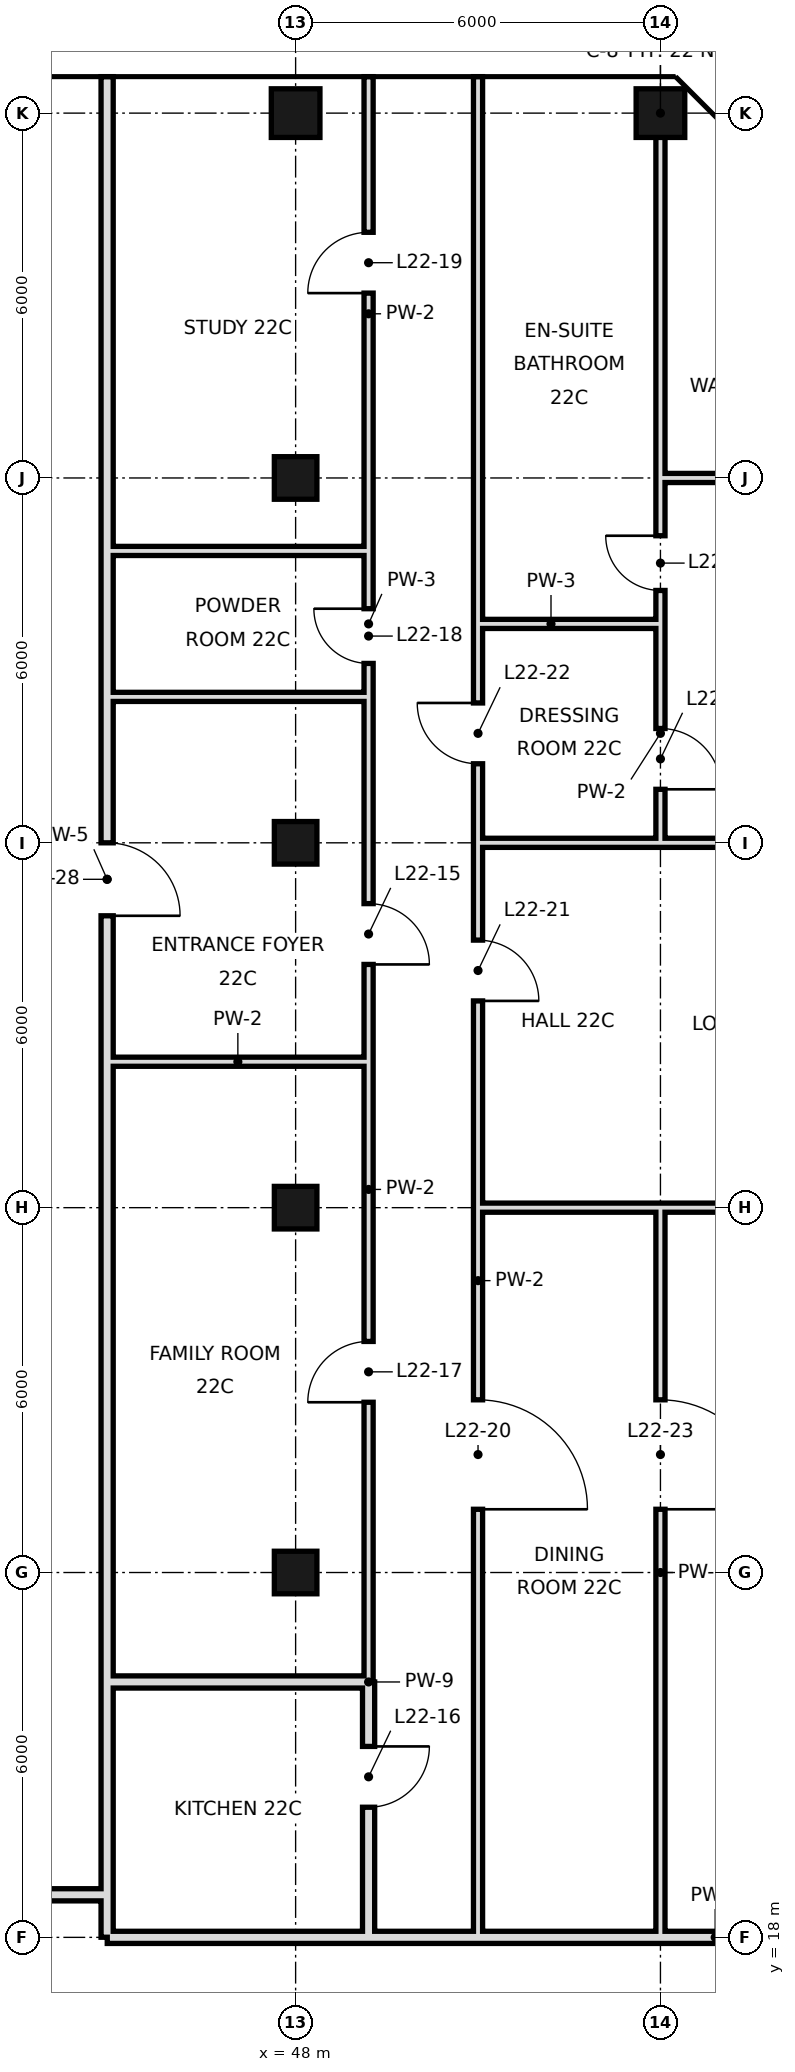
"""IFC4 building model, lengths in metres.
Left out: names, types, materials, properties, quantities, classifications, styles, units other than length and angle.
Written with IfcOpenShell. Run it as: python <this file> out.ifc"""

import sys

from ifc_helpers import new_model, si_unit, direction, frame, frame_2d, origin, origin_2d, place, context, subcontext, project, spatial, rectangle, hollow_rectangle, extrude, element, fill, save


model = new_model("IFC4")
c1 = context("Model", 3, precision=1e-05, world=origin(), true_north=direction((0.0, 1.0)))
c2 = subcontext(c1, "Body", "Model", "MODEL_VIEW")
j1 = project(units=[si_unit("LENGTHUNIT", "METRE"), si_unit("PLANEANGLEUNIT", "RADIAN")], contexts=[c1])
p1 = place(None, origin())
s1 = spatial("IfcSite", under=j1, at=p1, CompositionType="ELEMENT")
p2 = place(p1, origin())
s2 = spatial("IfcBuilding", under=s1, at=p2, CompositionType="ELEMENT")
p3 = place(p2, frame((0.0, 0.0, 103.4)))
s3 = spatial("IfcBuildingStorey", under=s2, at=p3, CompositionType="ELEMENT", Elevation=103.4)
for number, where, z_axis, x_axis in (
    (1, (48.0, 24.0, 0.0), (0.0, 0.0, 1.0), (1.0, 0.0, 0.0)),
    (2, (48.0, 30.0, 0.0), (0.0, 0.0, 1.0), (1.0, 0.0, 0.0)),
    (3, (48.0, 36.0, 0.0), (0.0, 0.0, 1.0), (1.0, 0.0, 0.0)),
    (4, (48.0, 42.0, 0.0), (0.0, 0.0, 1.0), (1.0, 0.0, 0.0)),
):
    element("IfcColumn", number, at=place(p3, frame(where, z_axis=z_axis, x_axis=x_axis)), inside=s3, PredefinedType="COLUMN", context=c2, shape_type="SweptSolid", body=[
        extrude(hollow_rectangle(XDim=0.7, YDim=0.7, WallThickness=0.036, at=origin_2d()), origin(), (0.0, 0.0, 1.0), 3.6),
    ])
for number, where, z_axis, x_axis in (
    (5, (48.0, 48.0, 0.0), (0.0, 0.0, 1.0), (1.0, 0.0, 0.0)),
    (6, (54.0, 48.0, 0.0), (0.0, 0.0, 1.0), (1.0, 0.0, 0.0)),
):
    element("IfcColumn", number, at=place(p3, frame(where, z_axis=z_axis, x_axis=x_axis)), inside=s3, PredefinedType="COLUMN", context=c2, shape_type="SweptSolid", body=[
        extrude(hollow_rectangle(XDim=0.8, YDim=0.8, WallThickness=0.04, at=origin_2d()), origin(), (0.0, 0.0, 1.0), 3.6),
    ])
p4 = place(p3, frame((44.9, 22.2, 0.0), z_axis=(0.0, 0.0, 1.0), x_axis=(0.0, 1.0, 0.0)))
e7 = element("IfcWall", 7, at=p4, inside=s3, PredefinedType="SOLIDWALL", context=c2, shape_type="SweptSolid", body=[
    extrude(rectangle(XDim=26.4, YDim=0.2, at=frame_2d((13.2, 0.0))), origin(), (0.0, 0.0, 1.0), 2.72),
])
p5 = place(p4, frame((12.6, 0.0, 0.0)))
e8 = element("IfcOpeningElement", 8, at=p5, cuts=e7, PredefinedType="OPENING", context=c2, shape_type="SweptSolid", body=[
    extrude(rectangle(XDim=1.2, YDim=2.4, at=frame_2d((0.6, 1.2))), frame((0.0, 0.11, 0.0), z_axis=(0.0, -1.0, 0.0), x_axis=(1.0, 0.0, 0.0)), (0.0, 0.0, 1.0), 0.22),
])
p6 = place(p3, frame((44.9, 18.002, 0.0), z_axis=(0.0, 0.0, 1.0), x_axis=(0.0, 1.0, 0.0)))
e9 = element("IfcWall", 9, at=p6, inside=s3, PredefinedType="SOLIDWALL", context=c2, shape_type="SweptSolid", body=[
    extrude(rectangle(XDim=4.198, YDim=0.2, at=frame_2d((2.099, 0.0))), origin(), (0.0, 0.0, 1.0), 3.42),
])
p7 = place(p3, frame((49.2, 18.0, 0.0), z_axis=(0.0, 0.0, 1.0), x_axis=(0.0, 1.0, 0.0)))
e10 = element("IfcWall", 10, at=p7, inside=s3, PredefinedType="SOLIDWALL", context=c2, shape_type="SweptSolid", body=[
    extrude(rectangle(XDim=4.2, YDim=0.2, at=frame_2d((2.1, 0.0))), origin(), (0.0, 0.0, 1.0), 2.72),
])
p8 = place(p7, frame((2.14, 0.0, 0.0)))
e11 = element("IfcOpeningElement", 11, at=p8, cuts=e10, PredefinedType="OPENING", context=c2, shape_type="SweptSolid", body=[
    extrude(rectangle(XDim=1.0, YDim=2.4, at=frame_2d((0.5, 1.2))), frame((0.0, 0.11, 0.0), z_axis=(0.0, -1.0, 0.0), x_axis=(1.0, 0.0, 0.0)), (0.0, 0.0, 1.0), 0.22),
])
p9 = place(p3, frame((49.2, 22.2, 0.0), z_axis=(0.0, 0.0, 1.0), x_axis=(0.0, 1.0, 0.0)))
e12 = element("IfcWall", 12, at=p9, inside=s3, PredefinedType="PARTITIONING", context=c2, shape_type="SweptSolid", body=[
    extrude(rectangle(XDim=16.2, YDim=0.15, at=frame_2d((8.1, 0.0))), origin(), (0.0, 0.0, 1.0), 3.42),
])
p10 = place(p9, frame((11.8, 0.0, 0.0)))
e13 = element("IfcOpeningElement", 13, at=p10, cuts=e12, PredefinedType="OPENING", context=c2, shape_type="SweptSolid", body=[
    extrude(rectangle(XDim=1.0, YDim=2.4, at=frame_2d((0.5, 1.2))), frame((0.0, 0.085, 0.0), z_axis=(0.0, -1.0, 0.0), x_axis=(1.0, 0.0, 0.0)), (0.0, 0.0, 1.0), 0.17),
])
p11 = place(p9, frame((4.6, 0.0, 0.0)))
e14 = element("IfcOpeningElement", 14, at=p11, cuts=e12, PredefinedType="OPENING", context=c2, shape_type="SweptSolid", body=[
    extrude(rectangle(XDim=1.0, YDim=2.4, at=frame_2d((0.5, 1.2))), frame((0.0, 0.085, 0.0), z_axis=(0.0, -1.0, 0.0), x_axis=(1.0, 0.0, 0.0)), (0.0, 0.0, 1.0), 0.17),
])
p12 = place(p3, frame((49.2, 40.8, 0.0), z_axis=(0.0, 0.0, 1.0), x_axis=(0.0, 1.0, 0.0)))
e15 = element("IfcWall", 15, at=p12, inside=s3, PredefinedType="PARTITIONING", context=c2, shape_type="SweptSolid", body=[
    extrude(rectangle(XDim=7.8, YDim=0.15, at=frame_2d((3.9, 0.0))), origin(), (0.0, 0.0, 1.0), 3.42),
])
p13 = place(p12, frame((4.24, 0.0, 0.0)))
e16 = element("IfcOpeningElement", 16, at=p13, cuts=e15, PredefinedType="OPENING", context=c2, shape_type="SweptSolid", body=[
    extrude(rectangle(XDim=1.0, YDim=2.4, at=frame_2d((0.5, 1.2))), frame((0.0, 0.085, 0.0), z_axis=(0.0, -1.0, 0.0), x_axis=(1.0, 0.0, 0.0)), (0.0, 0.0, 1.0), 0.17),
])
p14 = place(p3, frame((49.2, 38.4, 0.0), z_axis=(0.0, 0.0, 1.0), x_axis=(0.0, 1.0, 0.0)))
e17 = element("IfcWall", 17, at=p14, inside=s3, PredefinedType="PARTITIONING", context=c2, shape_type="SweptSolid", body=[
    extrude(rectangle(XDim=2.4, YDim=0.15, at=frame_2d((1.2, 0.0))), origin(), (0.0, 0.0, 1.0), 3.42),
])
p15 = place(p14, frame((0.55, 0.0, 0.0)))
e18 = element("IfcOpeningElement", 18, at=p15, cuts=e17, PredefinedType="OPENING", context=c2, shape_type="SweptSolid", body=[
    extrude(rectangle(XDim=0.9, YDim=2.4, at=frame_2d((0.45, 1.2))), frame((0.0, 0.085, 0.0), z_axis=(0.0, -1.0, 0.0), x_axis=(1.0, 0.0, 0.0)), (0.0, 0.0, 1.0), 0.17),
])
p16 = place(p3, frame((51.0, 18.0, 0.0), z_axis=(0.0, 0.0, 1.0), x_axis=(0.0, 1.0, 0.0)))
e19 = element("IfcWall", 19, at=p16, inside=s3, PredefinedType="PARTITIONING", context=c2, shape_type="SweptSolid", body=[
    extrude(rectangle(XDim=21.6, YDim=0.15, at=frame_2d((10.8, 0.0))), origin(), (0.0, 0.0, 1.0), 3.42),
])
p17 = place(p16, frame((7.04, 0.0, 0.0)))
e20 = element("IfcOpeningElement", 20, at=p17, cuts=e19, PredefinedType="OPENING", context=c2, shape_type="SweptSolid", body=[
    extrude(rectangle(XDim=1.8, YDim=2.4, at=frame_2d((0.9, 1.2))), frame((0.0, 0.085, 0.0), z_axis=(0.0, -1.0, 0.0), x_axis=(1.0, 0.0, 0.0)), (0.0, 0.0, 1.0), 0.17),
])
p18 = place(p16, frame((15.4, 0.0, 0.0)))
e21 = element("IfcOpeningElement", 21, at=p18, cuts=e19, PredefinedType="OPENING", context=c2, shape_type="SweptSolid", body=[
    extrude(rectangle(XDim=1.0, YDim=2.4, at=frame_2d((0.5, 1.2))), frame((0.0, 0.085, 0.0), z_axis=(0.0, -1.0, 0.0), x_axis=(1.0, 0.0, 0.0)), (0.0, 0.0, 1.0), 0.17),
])
p19 = place(p16, frame((19.3, 0.0, 0.0)))
e22 = element("IfcOpeningElement", 22, at=p19, cuts=e19, PredefinedType="OPENING", context=c2, shape_type="SweptSolid", body=[
    extrude(rectangle(XDim=1.0, YDim=2.4, at=frame_2d((0.5, 1.2))), frame((0.0, 0.085, 0.0), z_axis=(0.0, -1.0, 0.0), x_axis=(1.0, 0.0, 0.0)), (0.0, 0.0, 1.0), 0.17),
])
p20 = place(p3, frame((51.0, 39.6, 0.0), z_axis=(0.0, 0.0, 1.0), x_axis=(0.0, 1.0, 0.0)))
e23 = element("IfcWall", 23, at=p20, inside=s3, PredefinedType="PARTITIONING", context=c2, shape_type="SweptSolid", body=[
    extrude(rectangle(XDim=9.0, YDim=0.15, at=frame_2d((4.5, 0.0))), origin(), (0.0, 0.0, 1.0), 3.42),
])
p21 = place(p3, frame((54.0, 18.0, 0.0), z_axis=(0.0, 0.0, 1.0), x_axis=(0.0, 1.0, 0.0)))
e24 = element("IfcWall", 24, at=p21, inside=s3, PredefinedType="PARTITIONING", context=c2, shape_type="SweptSolid", body=[
    extrude(rectangle(XDim=12.0, YDim=0.15, at=frame_2d((6.0, 0.0))), origin(), (0.0, 0.0, 1.0), 3.42),
])
p22 = place(p21, frame((7.04, 0.0, 0.0)))
e25 = element("IfcOpeningElement", 25, at=p22, cuts=e24, PredefinedType="OPENING", context=c2, shape_type="SweptSolid", body=[
    extrude(rectangle(XDim=1.8, YDim=2.4, at=frame_2d((0.9, 1.2))), frame((0.0, 0.085, 0.0), z_axis=(0.0, -1.0, 0.0), x_axis=(1.0, 0.0, 0.0)), (0.0, 0.0, 1.0), 0.17),
])
p23 = place(p3, frame((54.0, 36.0, 0.0), z_axis=(0.0, 0.0, 1.0), x_axis=(0.0, 1.0, 0.0)))
e26 = element("IfcWall", 26, at=p23, inside=s3, PredefinedType="PARTITIONING", context=c2, shape_type="SweptSolid", body=[
    extrude(rectangle(XDim=3.6, YDim=0.15, at=frame_2d((1.8, 0.0))), origin(), (0.0, 0.0, 1.0), 3.42),
])
p24 = place(p23, frame((0.88, 0.0, 0.0)))
e27 = element("IfcOpeningElement", 27, at=p24, cuts=e26, PredefinedType="OPENING", context=c2, shape_type="SweptSolid", body=[
    extrude(rectangle(XDim=1.0, YDim=2.4, at=frame_2d((0.5, 1.2))), frame((0.0, 0.085, 0.0), z_axis=(0.0, -1.0, 0.0), x_axis=(1.0, 0.0, 0.0)), (0.0, 0.0, 1.0), 0.17),
])
p25 = place(p3, frame((54.0, 39.6, 0.0), z_axis=(0.0, 0.0, 1.0), x_axis=(0.0, 1.0, 0.0)))
e28 = element("IfcWall", 28, at=p25, inside=s3, PredefinedType="PARTITIONING", context=c2, shape_type="SweptSolid", body=[
    extrude(rectangle(XDim=8.4, YDim=0.15, at=frame_2d((4.2, 0.0))), origin(), (0.0, 0.0, 1.0), 3.42),
])
p26 = place(p25, frame((0.55, 0.0, 0.0)))
e29 = element("IfcOpeningElement", 29, at=p26, cuts=e28, PredefinedType="OPENING", context=c2, shape_type="SweptSolid", body=[
    extrude(rectangle(XDim=0.9, YDim=2.4, at=frame_2d((0.45, 1.2))), frame((0.0, 0.085, 0.0), z_axis=(0.0, -1.0, 0.0), x_axis=(1.0, 0.0, 0.0)), (0.0, 0.0, 1.0), 0.17),
])
p27 = place(p3, frame((49.2, 18.0, 0.0), z_axis=(0.0, 0.0, 1.0), x_axis=(1.0, 0.0, 0.0)))
e30 = element("IfcWall", 30, at=p27, inside=s3, PredefinedType="SOLIDWALL", context=c2, shape_type="SweptSolid", body=[
    extrude(rectangle(XDim=11.4, YDim=0.2, at=frame_2d((5.7, 0.0))), origin(), (0.0, 0.0, 1.0), 2.72),
])
p28 = place(p3, frame((44.902, 18.0, 0.0), z_axis=(0.0, 0.0, 1.0), x_axis=(1.0, 0.0, 0.0)))
e31 = element("IfcWall", 31, at=p28, inside=s3, PredefinedType="SOLIDWALL", context=c2, shape_type="SweptSolid", body=[
    extrude(rectangle(XDim=4.298, YDim=0.2, at=frame_2d((2.149, 0.0))), origin(), (0.0, 0.0, 1.0), 2.72),
])
p29 = place(p3, frame((3.1, 18.7, 0.0), z_axis=(0.0, 0.0, 1.0), x_axis=(1.0, 0.0, 0.0)))
e32 = element("IfcWall", 32, at=p29, inside=s3, PredefinedType="SOLIDWALL", context=c2, shape_type="SweptSolid", body=[
    extrude(rectangle(XDim=41.8, YDim=0.2, at=frame_2d((20.9, 0.0))), origin(), (0.0, 0.0, 1.0), 2.72),
])
p30 = place(p29, frame((18.12, 0.0, 0.0)))
e33 = element("IfcOpeningElement", 33, at=p30, cuts=e32, PredefinedType="OPENING", context=c2, shape_type="SweptSolid", body=[
    extrude(rectangle(XDim=1.2, YDim=2.4, at=frame_2d((0.6, 1.2))), frame((0.0, 0.11, 0.0), z_axis=(0.0, -1.0, 0.0), x_axis=(1.0, 0.0, 0.0)), (0.0, 0.0, 1.0), 0.22),
])
p31 = place(p29, frame((26.73, 0.0, 0.0)))
e34 = element("IfcOpeningElement", 34, at=p31, cuts=e32, PredefinedType="OPENING", context=c2, shape_type="SweptSolid", body=[
    extrude(rectangle(XDim=1.8, YDim=2.4, at=frame_2d((0.9, 1.2))), frame((0.0, 0.11, 0.0), z_axis=(0.0, -1.0, 0.0), x_axis=(1.0, 0.0, 0.0)), (0.0, 0.0, 1.0), 0.22),
])
p32 = place(p3, frame((44.9, 22.2, 0.0), z_axis=(0.0, 0.0, 1.0), x_axis=(1.0, 0.0, 0.0)))
e35 = element("IfcWall", 35, at=p32, inside=s3, PredefinedType="SOLIDWALL", context=c2, shape_type="SweptSolid", body=[
    extrude(rectangle(XDim=4.3, YDim=0.2, at=frame_2d((2.15, 0.0))), origin(), (0.0, 0.0, 1.0), 2.72),
])
p33 = place(p3, frame((51.0, 30.0, 0.0), z_axis=(0.0, 0.0, 1.0), x_axis=(1.0, 0.0, 0.0)))
e36 = element("IfcWall", 36, at=p33, inside=s3, PredefinedType="PARTITIONING", context=c2, shape_type="SweptSolid", body=[
    extrude(rectangle(XDim=9.6, YDim=0.15, at=frame_2d((4.8, 0.0))), origin(), (0.0, 0.0, 1.0), 2.72),
])
p34 = place(p3, frame((44.9, 32.4, 0.0), z_axis=(0.0, 0.0, 1.0), x_axis=(1.0, 0.0, 0.0)))
e37 = element("IfcWall", 37, at=p34, inside=s3, PredefinedType="PARTITIONING", context=c2, shape_type="SweptSolid", body=[
    extrude(rectangle(XDim=4.3, YDim=0.15, at=frame_2d((2.15, 0.0))), origin(), (0.0, 0.0, 1.0), 3.42),
])
p35 = place(p3, frame((51.0, 36.0, 0.0), z_axis=(0.0, 0.0, 1.0), x_axis=(1.0, 0.0, 0.0)))
e38 = element("IfcWall", 38, at=p35, inside=s3, PredefinedType="PARTITIONING", context=c2, shape_type="SweptSolid", body=[
    extrude(rectangle(XDim=9.0, YDim=0.15, at=frame_2d((4.5, 0.0))), origin(), (0.0, 0.0, 1.0), 2.72),
])
p36 = place(p3, frame((44.9, 38.4, 0.0), z_axis=(0.0, 0.0, 1.0), x_axis=(1.0, 0.0, 0.0)))
e39 = element("IfcWall", 39, at=p36, inside=s3, PredefinedType="PARTITIONING", context=c2, shape_type="SweptSolid", body=[
    extrude(rectangle(XDim=4.3, YDim=0.15, at=frame_2d((2.15, 0.0))), origin(), (0.0, 0.0, 1.0), 3.42),
])
p37 = place(p3, frame((51.0, 39.6, 0.0), z_axis=(0.0, 0.0, 1.0), x_axis=(1.0, 0.0, 0.0)))
e40 = element("IfcWall", 40, at=p37, inside=s3, PredefinedType="PARTITIONING", context=c2, shape_type="SweptSolid", body=[
    extrude(rectangle(XDim=3.0, YDim=0.15, at=frame_2d((1.5, 0.0))), origin(), (0.0, 0.0, 1.0), 3.42),
])
p38 = place(p3, frame((44.9, 40.8, 0.0), z_axis=(0.0, 0.0, 1.0), x_axis=(1.0, 0.0, 0.0)))
e41 = element("IfcWall", 41, at=p38, inside=s3, PredefinedType="PARTITIONING", context=c2, shape_type="SweptSolid", body=[
    extrude(rectangle(XDim=4.3, YDim=0.15, at=frame_2d((2.15, 0.0))), origin(), (0.0, 0.0, 1.0), 3.42),
])
p39 = place(p3, frame((54.0, 42.0, 0.0), z_axis=(0.0, 0.0, 1.0), x_axis=(1.0, 0.0, 0.0)))
e42 = element("IfcWall", 42, at=p39, inside=s3, PredefinedType="PARTITIONING", context=c2, shape_type="SweptSolid", body=[
    extrude(rectangle(XDim=6.0, YDim=0.15, at=frame_2d((3.0, 0.0))), origin(), (0.0, 0.0, 1.0), 2.72),
])
p40 = place(p39, frame((3.4, 0.0, 0.0)))
e43 = element("IfcOpeningElement", 43, at=p40, cuts=e42, PredefinedType="OPENING", context=c2, shape_type="SweptSolid", body=[
    extrude(rectangle(XDim=1.0, YDim=2.4, at=frame_2d((0.5, 1.2))), frame((0.0, 0.085, 0.0), z_axis=(0.0, -1.0, 0.0), x_axis=(1.0, 0.0, 0.0)), (0.0, 0.0, 1.0), 0.17),
])
p41 = place(p10, frame((1.0, 0.0, 0.0), z_axis=(0.0, 0.0, 1.0), x_axis=(-1.0, 0.0, 0.0)))
e44 = element("IfcDoor", 44, at=p41, inside=s3, OperationType="SINGLE_SWING_RIGHT", PredefinedType="DOOR", context=c2, shape_type="SweptSolid", body=[
    extrude(rectangle(XDim=1.0, YDim=2.4, at=frame_2d((0.5, 1.2))), frame((0.0, 0.025, 0.0), z_axis=(0.0, -1.0, 0.0), x_axis=(1.0, 0.0, 0.0)), (0.0, 0.0, 1.0), 0.05),
])
fill(e13, e44)
p42 = place(p8, origin())
e45 = element("IfcDoor", 45, at=p42, inside=s3, OperationType="SINGLE_SWING_RIGHT", PredefinedType="DOOR", context=c2, shape_type="SweptSolid", body=[
    extrude(rectangle(XDim=1.0, YDim=2.4, at=frame_2d((0.5, 1.2))), frame((0.0, 0.025, 0.0), z_axis=(0.0, -1.0, 0.0), x_axis=(1.0, 0.0, 0.0)), (0.0, 0.0, 1.0), 0.05),
])
fill(e11, e45)
p43 = place(p11, origin())
e46 = element("IfcDoor", 46, at=p43, inside=s3, OperationType="SINGLE_SWING_LEFT", PredefinedType="DOOR", context=c2, shape_type="SweptSolid", body=[
    extrude(rectangle(XDim=1.0, YDim=2.4, at=frame_2d((0.5, 1.2))), frame((0.0, 0.025, 0.0), z_axis=(0.0, -1.0, 0.0), x_axis=(1.0, 0.0, 0.0)), (0.0, 0.0, 1.0), 0.05),
])
fill(e14, e46)
p44 = place(p15, frame((0.9, 0.0, 0.0), z_axis=(0.0, 0.0, 1.0), x_axis=(-1.0, 0.0, 0.0)))
e47 = element("IfcDoor", 47, at=p44, inside=s3, OperationType="SINGLE_SWING_LEFT", PredefinedType="DOOR", context=c2, shape_type="SweptSolid", body=[
    extrude(rectangle(XDim=0.9, YDim=2.4, at=frame_2d((0.45, 1.2))), frame((0.0, 0.025, 0.0), z_axis=(0.0, -1.0, 0.0), x_axis=(1.0, 0.0, 0.0)), (0.0, 0.0, 1.0), 0.05),
])
fill(e18, e47)
p45 = place(p13, origin())
e48 = element("IfcDoor", 48, at=p45, inside=s3, OperationType="SINGLE_SWING_LEFT", PredefinedType="DOOR", context=c2, shape_type="SweptSolid", body=[
    extrude(rectangle(XDim=1.0, YDim=2.4, at=frame_2d((0.5, 1.2))), frame((0.0, 0.025, 0.0), z_axis=(0.0, -1.0, 0.0), x_axis=(1.0, 0.0, 0.0)), (0.0, 0.0, 1.0), 0.05),
])
fill(e16, e48)
p46 = place(p17, frame((1.8, 0.0, 0.0), z_axis=(0.0, 0.0, 1.0), x_axis=(-1.0, 0.0, 0.0)))
e49 = element("IfcDoor", 49, at=p46, inside=s3, OperationType="SINGLE_SWING_RIGHT", PredefinedType="DOOR", context=c2, shape_type="SweptSolid", body=[
    extrude(rectangle(XDim=1.8, YDim=2.4, at=frame_2d((0.9, 1.2))), frame((0.0, 0.025, 0.0), z_axis=(0.0, -1.0, 0.0), x_axis=(1.0, 0.0, 0.0)), (0.0, 0.0, 1.0), 0.05),
])
fill(e20, e49)
p47 = place(p18, frame((1.0, 0.0, 0.0), z_axis=(0.0, 0.0, 1.0), x_axis=(-1.0, 0.0, 0.0)))
e50 = element("IfcDoor", 50, at=p47, inside=s3, OperationType="SINGLE_SWING_RIGHT", PredefinedType="DOOR", context=c2, shape_type="SweptSolid", body=[
    extrude(rectangle(XDim=1.0, YDim=2.4, at=frame_2d((0.5, 1.2))), frame((0.0, 0.025, 0.0), z_axis=(0.0, -1.0, 0.0), x_axis=(1.0, 0.0, 0.0)), (0.0, 0.0, 1.0), 0.05),
])
fill(e21, e50)
p48 = place(p19, frame((1.0, 0.0, 0.0), z_axis=(0.0, 0.0, 1.0), x_axis=(-1.0, 0.0, 0.0)))
e51 = element("IfcDoor", 51, at=p48, inside=s3, OperationType="SINGLE_SWING_LEFT", PredefinedType="DOOR", context=c2, shape_type="SweptSolid", body=[
    extrude(rectangle(XDim=1.0, YDim=2.4, at=frame_2d((0.5, 1.2))), frame((0.0, 0.025, 0.0), z_axis=(0.0, -1.0, 0.0), x_axis=(1.0, 0.0, 0.0)), (0.0, 0.0, 1.0), 0.05),
])
fill(e22, e51)
p49 = place(p22, frame((1.8, 0.0, 0.0), z_axis=(0.0, 0.0, 1.0), x_axis=(-1.0, 0.0, 0.0)))
e52 = element("IfcDoor", 52, at=p49, inside=s3, OperationType="SINGLE_SWING_RIGHT", PredefinedType="DOOR", context=c2, shape_type="SweptSolid", body=[
    extrude(rectangle(XDim=1.8, YDim=2.4, at=frame_2d((0.9, 1.2))), frame((0.0, 0.025, 0.0), z_axis=(0.0, -1.0, 0.0), x_axis=(1.0, 0.0, 0.0)), (0.0, 0.0, 1.0), 0.05),
])
fill(e25, e52)
p50 = place(p24, frame((1.0, 0.0, 0.0), z_axis=(0.0, 0.0, 1.0), x_axis=(-1.0, 0.0, 0.0)))
e53 = element("IfcDoor", 53, at=p50, inside=s3, OperationType="SINGLE_SWING_RIGHT", PredefinedType="DOOR", context=c2, shape_type="SweptSolid", body=[
    extrude(rectangle(XDim=1.0, YDim=2.4, at=frame_2d((0.5, 1.2))), frame((0.0, 0.025, 0.0), z_axis=(0.0, -1.0, 0.0), x_axis=(1.0, 0.0, 0.0)), (0.0, 0.0, 1.0), 0.05),
])
fill(e27, e53)
p51 = place(p26, frame((0.9, 0.0, 0.0), z_axis=(0.0, 0.0, 1.0), x_axis=(-1.0, 0.0, 0.0)))
e54 = element("IfcDoor", 54, at=p51, inside=s3, OperationType="SINGLE_SWING_LEFT", PredefinedType="DOOR", context=c2, shape_type="SweptSolid", body=[
    extrude(rectangle(XDim=0.9, YDim=2.4, at=frame_2d((0.45, 1.2))), frame((0.0, 0.025, 0.0), z_axis=(0.0, -1.0, 0.0), x_axis=(1.0, 0.0, 0.0)), (0.0, 0.0, 1.0), 0.05),
])
fill(e29, e54)
p52 = place(p5, frame((1.2, 0.0, 0.0), z_axis=(0.0, 0.0, 1.0), x_axis=(-1.0, 0.0, 0.0)))
e55 = element("IfcDoor", 55, at=p52, inside=s3, OperationType="SINGLE_SWING_RIGHT", PredefinedType="DOOR", context=c2, shape_type="SweptSolid", body=[
    extrude(rectangle(XDim=1.2, YDim=2.4, at=frame_2d((0.6, 1.2))), frame((0.0, 0.025, 0.0), z_axis=(0.0, -1.0, 0.0), x_axis=(1.0, 0.0, 0.0)), (0.0, 0.0, 1.0), 0.05),
])
fill(e8, e55)
save(model, sys.argv[1])
